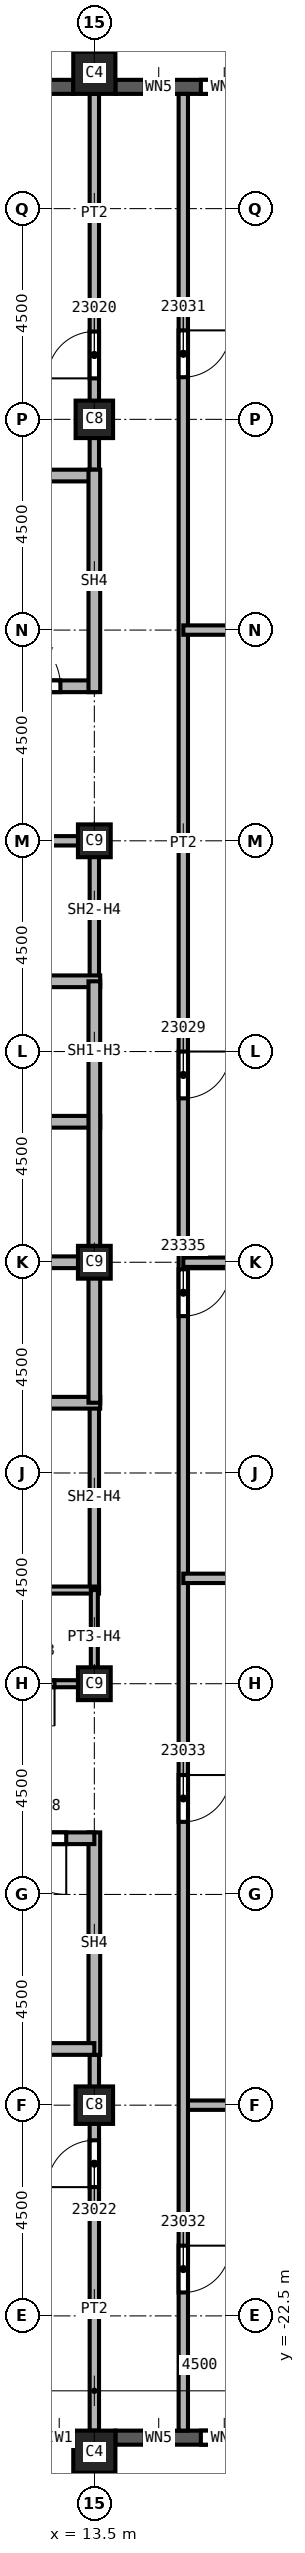
"""IFC4 building model, lengths in metres.
Left out: names, types, materials, properties, quantities, classifications, styles, units other than length and angle.
Written with IfcOpenShell. Run it as: python <this file> out.ifc"""

import sys

from ifc_helpers import new_model, si_unit, direction, frame, frame_2d, origin, origin_2d, place, context, subcontext, project, spatial, rectangle, extrude, element, fill, save


model = new_model("IFC4")
c1 = context("Model", 3, precision=1e-05, world=origin(), true_north=direction((0.0, 1.0)))
c2 = subcontext(c1, "Body", "Model", "MODEL_VIEW")
j1 = project(units=[si_unit("LENGTHUNIT", "METRE"), si_unit("PLANEANGLEUNIT", "RADIAN")], contexts=[c1])
p1 = place(None, origin())
s1 = spatial("IfcSite", under=j1, at=p1, CompositionType="ELEMENT")
p2 = place(p1, origin())
s2 = spatial("IfcBuilding", under=s1, at=p2, CompositionType="ELEMENT")
p3 = place(p2, frame((0.0, 0.0, 330.0)))
s3 = spatial("IfcBuildingStorey", under=s2, at=p3, CompositionType="ELEMENT", Elevation=330.0)
for number, where, z_axis, x_axis in (
    (1, (13.5, 18.0, 0.0), (0.0, 0.0, 1.0), (1.0, 0.0, 0.0)),
    (2, (13.5, -18.0, 0.0), (0.0, 0.0, 1.0), (1.0, 0.0, 0.0)),
):
    element("IfcColumn", number, at=place(p3, frame(where, z_axis=z_axis, x_axis=x_axis)), inside=s3, PredefinedType="COLUMN", context=c2, shape_type="SweptSolid", body=[
        extrude(rectangle(XDim=0.8, YDim=0.8, at=origin_2d()), origin(), (0.0, 0.0, 1.0), 3.74),
    ])
for number, where, z_axis, x_axis in (
    (3, (13.5, 0.0, 0.0), (0.0, 0.0, 1.0), (1.0, 0.0, 0.0)),
    (4, (13.5, 9.0, 0.0), (0.0, 0.0, 1.0), (1.0, 0.0, 0.0)),
    (5, (13.5, -9.0, 0.0), (0.0, 0.0, 1.0), (1.0, 0.0, 0.0)),
):
    element("IfcColumn", number, at=place(p3, frame(where, z_axis=z_axis, x_axis=x_axis)), inside=s3, PredefinedType="COLUMN", context=c2, shape_type="SweptSolid", body=[
        extrude(rectangle(XDim=0.7, YDim=0.7, at=origin_2d()), origin(), (0.0, 0.0, 1.0), 3.74),
    ])
for number, where, z_axis, x_axis in (
    (6, (13.5, 25.4, 0.0), (0.0, 0.0, 1.0), (1.0, 0.0, 0.0)),
    (7, (13.5, -25.4, 0.0), (0.0, 0.0, 1.0), (1.0, 0.0, 0.0)),
):
    element("IfcColumn", number, at=place(p3, frame(where, z_axis=z_axis, x_axis=x_axis)), inside=s3, PredefinedType="COLUMN", context=c2, shape_type="SweptSolid", body=[
        extrude(rectangle(XDim=0.9, YDim=0.9, at=origin_2d()), origin(), (0.0, 0.0, 1.0), 3.74),
    ])
p4 = place(p3, frame((9.45, -25.1, 0.0), z_axis=(0.0, 0.0, 1.0), x_axis=(1.0, 0.0, 0.0)))
e8 = element("IfcWall", 8, at=p4, inside=s3, PredefinedType="SOLIDWALL", context=c2, shape_type="SweptSolid", body=[
    extrude(rectangle(XDim=3.6, YDim=0.3, at=frame_2d((1.8, 0.0))), origin(), (0.0, 0.0, 1.0), 3.14),
])
p5 = place(p4, frame((0.6, 0.0, 0.8)))
e9 = element("IfcOpeningElement", 9, at=p5, cuts=e8, PredefinedType="OPENING", context=c2, shape_type="SweptSolid", body=[
    extrude(rectangle(XDim=2.4, YDim=1.95, at=frame_2d((1.2, 0.975))), frame((0.0, 0.15, 0.0), z_axis=(0.0, -1.0, 0.0), x_axis=(1.0, 0.0, 0.0)), (0.0, 0.0, 1.0), 0.3),
])
p6 = place(p3, frame((13.95, -25.1, 0.0), z_axis=(0.0, 0.0, 1.0), x_axis=(1.0, 0.0, 0.0)))
e10 = element("IfcWall", 10, at=p6, inside=s3, PredefinedType="SOLIDWALL", context=c2, shape_type="SweptSolid", body=[
    extrude(rectangle(XDim=3.6, YDim=0.3, at=frame_2d((1.8, 0.0))), origin(), (0.0, 0.0, 1.0), 3.14),
])
p7 = place(p6, frame((0.625, 0.0, 0.8)))
e11 = element("IfcOpeningElement", 11, at=p7, cuts=e10, PredefinedType="OPENING", context=c2, shape_type="SweptSolid", body=[
    extrude(rectangle(XDim=0.6, YDim=1.95, at=frame_2d((0.3, 0.975))), frame((0.0, 0.15, 0.0), z_axis=(0.0, -1.0, 0.0), x_axis=(1.0, 0.0, 0.0)), (0.0, 0.0, 1.0), 0.3),
])
p8 = place(p6, frame((1.825, 0.0, 0.8)))
e12 = element("IfcOpeningElement", 12, at=p8, cuts=e10, PredefinedType="OPENING", context=c2, shape_type="SweptSolid", body=[
    extrude(rectangle(XDim=1.0, YDim=1.95, at=frame_2d((0.5, 0.975))), frame((0.0, 0.15, 0.0), z_axis=(0.0, -1.0, 0.0), x_axis=(1.0, 0.0, 0.0)), (0.0, 0.0, 1.0), 0.3),
])
p9 = place(p3, frame((17.55, 25.1, 0.0), z_axis=(0.0, 0.0, 1.0), x_axis=(-1.0, 0.0, 0.0)))
e13 = element("IfcWall", 13, at=p9, inside=s3, PredefinedType="SOLIDWALL", context=c2, shape_type="SweptSolid", body=[
    extrude(rectangle(XDim=3.6, YDim=0.3, at=frame_2d((1.8, 0.0))), origin(), (0.0, 0.0, 1.0), 3.14),
])
p10 = place(p9, frame((0.775, 0.0, 0.8)))
e14 = element("IfcOpeningElement", 14, at=p10, cuts=e13, PredefinedType="OPENING", context=c2, shape_type="SweptSolid", body=[
    extrude(rectangle(XDim=1.0, YDim=1.95, at=frame_2d((0.5, 0.975))), frame((0.0, 0.15, 0.0), z_axis=(0.0, -1.0, 0.0), x_axis=(1.0, 0.0, 0.0)), (0.0, 0.0, 1.0), 0.3),
])
p11 = place(p9, frame((2.375, 0.0, 0.8)))
e15 = element("IfcOpeningElement", 15, at=p11, cuts=e13, PredefinedType="OPENING", context=c2, shape_type="SweptSolid", body=[
    extrude(rectangle(XDim=0.6, YDim=1.95, at=frame_2d((0.3, 0.975))), frame((0.0, 0.15, 0.0), z_axis=(0.0, -1.0, 0.0), x_axis=(1.0, 0.0, 0.0)), (0.0, 0.0, 1.0), 0.3),
])
p12 = place(p3, frame((13.05, 25.1, 0.0), z_axis=(0.0, 0.0, 1.0), x_axis=(-1.0, 0.0, 0.0)))
e16 = element("IfcWall", 16, at=p12, inside=s3, PredefinedType="SOLIDWALL", context=c2, shape_type="SweptSolid", body=[
    extrude(rectangle(XDim=3.6, YDim=0.3, at=frame_2d((1.8, 0.0))), origin(), (0.0, 0.0, 1.0), 3.14),
])
p13 = place(p12, frame((0.6, 0.0, 0.8)))
e17 = element("IfcOpeningElement", 17, at=p13, cuts=e16, PredefinedType="OPENING", context=c2, shape_type="SweptSolid", body=[
    extrude(rectangle(XDim=2.4, YDim=1.95, at=frame_2d((1.2, 0.975))), frame((0.0, 0.15, 0.0), z_axis=(0.0, -1.0, 0.0), x_axis=(1.0, 0.0, 0.0)), (0.0, 0.0, 1.0), 0.3),
])
p14 = place(p3, frame((13.5, -24.95, 0.0), z_axis=(0.0, 0.0, 1.0), x_axis=(0.0, 1.0, 0.0)))
e18 = element("IfcWall", 18, at=p14, inside=s3, PredefinedType="PARTITIONING", context=c2, shape_type="SweptSolid", body=[
    extrude(rectangle(XDim=8.275, YDim=0.2, at=frame_2d((4.137, 0.0))), origin(), (0.0, 0.0, 1.0), 3.74),
])
p15 = place(p14, frame((5.2, 0.0, 0.0)))
e19 = element("IfcOpeningElement", 19, at=p15, cuts=e18, PredefinedType="OPENING", context=c2, shape_type="SweptSolid", body=[
    extrude(rectangle(XDim=1.0, YDim=2.1, at=frame_2d((0.5, 1.05))), frame((0.0, 0.1, 0.0), z_axis=(0.0, -1.0, 0.0), x_axis=(1.0, 0.0, 0.0)), (0.0, 0.0, 1.0), 0.2),
])
p16 = place(p3, frame((13.5, 16.675, 0.0), z_axis=(0.0, 0.0, 1.0), x_axis=(0.0, 1.0, 0.0)))
e20 = element("IfcWall", 20, at=p16, inside=s3, PredefinedType="PARTITIONING", context=c2, shape_type="SweptSolid", body=[
    extrude(rectangle(XDim=8.275, YDim=0.2, at=frame_2d((4.137, 0.0))), origin(), (0.0, 0.0, 1.0), 3.74),
])
p17 = place(p16, frame((2.2, 0.0, 0.0)))
e21 = element("IfcOpeningElement", 21, at=p17, cuts=e20, PredefinedType="OPENING", context=c2, shape_type="SweptSolid", body=[
    extrude(rectangle(XDim=1.0, YDim=2.1, at=frame_2d((0.5, 1.05))), frame((0.0, 0.1, 0.0), z_axis=(0.0, -1.0, 0.0), x_axis=(1.0, 0.0, 0.0)), (0.0, 0.0, 1.0), 0.2),
])
p18 = place(p3, frame((15.4, -18.0, 0.0), z_axis=(0.0, 0.0, 1.0), x_axis=(1.0, 0.0, 0.0)))
e22 = element("IfcWall", 22, at=p18, inside=s3, PredefinedType="PARTITIONING", context=c2, shape_type="SweptSolid", body=[
    extrude(rectangle(XDim=8.9, YDim=0.2, at=frame_2d((4.45, 0.0))), origin(), (0.0, 0.0, 1.0), 3.74),
])
p19 = place(p3, frame((15.4, 24.95, 0.0), z_axis=(0.0, 0.0, 1.0), x_axis=(0.0, -1.0, 0.0)))
e23 = element("IfcWall", 23, at=p19, inside=s3, PredefinedType="PARTITIONING", context=c2, shape_type="SweptSolid", body=[
    extrude(rectangle(XDim=49.9, YDim=0.2, at=frame_2d((24.95, 0.0))), origin(), (0.0, 0.0, 1.0), 3.74),
])
p20 = place(p19, frame((20.45, 0.0, 0.0)))
e24 = element("IfcOpeningElement", 24, at=p20, cuts=e23, PredefinedType="OPENING", context=c2, shape_type="SweptSolid", body=[
    extrude(rectangle(XDim=1.0, YDim=2.1, at=frame_2d((0.5, 1.05))), frame((0.0, 0.1, 0.0), z_axis=(0.0, -1.0, 0.0), x_axis=(1.0, 0.0, 0.0)), (0.0, 0.0, 1.0), 0.2),
])
p21 = place(p19, frame((5.05, 0.0, 0.0)))
e25 = element("IfcOpeningElement", 25, at=p21, cuts=e23, PredefinedType="OPENING", context=c2, shape_type="SweptSolid", body=[
    extrude(rectangle(XDim=1.0, YDim=2.1, at=frame_2d((0.5, 1.05))), frame((0.0, 0.1, 0.0), z_axis=(0.0, -1.0, 0.0), x_axis=(1.0, 0.0, 0.0)), (0.0, 0.0, 1.0), 0.2),
])
p22 = place(p19, frame((45.95, 0.0, 0.0)))
e26 = element("IfcOpeningElement", 26, at=p22, cuts=e23, PredefinedType="OPENING", context=c2, shape_type="SweptSolid", body=[
    extrude(rectangle(XDim=1.0, YDim=2.1, at=frame_2d((0.5, 1.05))), frame((0.0, 0.1, 0.0), z_axis=(0.0, -1.0, 0.0), x_axis=(1.0, 0.0, 0.0)), (0.0, 0.0, 1.0), 0.2),
])
p23 = place(p19, frame((35.9, 0.0, 0.0)))
e27 = element("IfcOpeningElement", 27, at=p23, cuts=e23, PredefinedType="OPENING", context=c2, shape_type="SweptSolid", body=[
    extrude(rectangle(XDim=1.0, YDim=2.1, at=frame_2d((0.5, 1.05))), frame((0.0, 0.1, 0.0), z_axis=(0.0, -1.0, 0.0), x_axis=(1.0, 0.0, 0.0)), (0.0, 0.0, 1.0), 0.2),
])
p24 = place(p19, frame((25.1, 0.0, 0.0)))
e28 = element("IfcOpeningElement", 28, at=p24, cuts=e23, PredefinedType="OPENING", context=c2, shape_type="SweptSolid", body=[
    extrude(rectangle(XDim=1.0, YDim=2.1, at=frame_2d((0.5, 1.05))), frame((0.0, 0.1, 0.0), z_axis=(0.0, -1.0, 0.0), x_axis=(1.0, 0.0, 0.0)), (0.0, 0.0, 1.0), 0.2),
])
for number, where, z_axis, x_axis in (
    (29, (15.4, -6.75, 0.0), (0.0, 0.0, 1.0), (1.0, 0.0, 0.0)),
    (30, (15.4, 13.5, 0.0), (0.0, 0.0, 1.0), (1.0, 0.0, 0.0)),
    (31, (26.55, 0.0, 0.0), (0.0, 0.0, 1.0), (-1.0, 0.0, 0.0)),
):
    element("IfcWall", number, at=place(p3, frame(where, z_axis=z_axis, x_axis=x_axis)), inside=s3, PredefinedType="PARTITIONING", context=c2, shape_type="SweptSolid", body=[
        extrude(rectangle(XDim=11.15, YDim=0.2, at=frame_2d((5.575, 0.0))), origin(), (0.0, 0.0, 1.0), 3.74),
    ])
p25 = place(p3, frame((10.5, 9.0, 0.0), z_axis=(0.0, 0.0, 1.0), x_axis=(1.0, 0.0, 0.0)))
e32 = element("IfcWall", 32, at=p25, inside=s3, PredefinedType="SOLIDWALL", context=c2, shape_type="SweptSolid", body=[
    extrude(rectangle(XDim=3.0, YDim=0.2, at=frame_2d((1.5, 0.0))), origin(), (0.0, 0.0, 1.0), 3.062),
])
p26 = place(p3, frame((13.5, -3.0, 0.0), z_axis=(0.0, 0.0, 1.0), x_axis=(0.0, -1.0, 0.0)))
e33 = element("IfcWall", 33, at=p26, inside=s3, PredefinedType="SOLIDWALL", context=c2, shape_type="SweptSolid", body=[
    extrude(rectangle(XDim=4.0, YDim=0.2, at=frame_2d((2.0, 0.0))), origin(), (0.0, 0.0, 1.0), 3.062),
])
p27 = place(p3, frame((13.5, 9.1, 0.0), z_axis=(0.0, 0.0, 1.0), x_axis=(0.0, -1.0, 0.0)))
e34 = element("IfcWall", 34, at=p27, inside=s3, PredefinedType="SOLIDWALL", context=c2, shape_type="SweptSolid", body=[
    extrude(rectangle(XDim=3.1, YDim=0.2, at=frame_2d((1.55, 0.0))), origin(), (0.0, 0.0, 1.0), 3.062),
])
p28 = place(p3, frame((7.5, -3.0, 0.0), z_axis=(0.0, 0.0, 1.0), x_axis=(1.0, 0.0, 0.0)))
e35 = element("IfcWall", 35, at=p28, inside=s3, PredefinedType="SOLIDWALL", context=c2, shape_type="SweptSolid", body=[
    extrude(rectangle(XDim=6.125, YDim=0.25, at=frame_2d((3.062, 0.0))), origin(), (0.0, 0.0, 1.0), 3.74),
])
p29 = place(p28, frame((1.75, 0.0, 0.0)))
e36 = element("IfcOpeningElement", 36, at=p29, cuts=e35, PredefinedType="OPENING", context=c2, shape_type="SweptSolid", body=[
    extrude(rectangle(XDim=1.1, YDim=2.1, at=frame_2d((0.55, 1.05))), frame((0.0, 0.125, 0.0), z_axis=(0.0, -1.0, 0.0), x_axis=(1.0, 0.0, 0.0)), (0.0, 0.0, 1.0), 0.25),
])
p30 = place(p3, frame((7.5, 3.0, 0.0), z_axis=(0.0, 0.0, 1.0), x_axis=(1.0, 0.0, 0.0)))
e37 = element("IfcWall", 37, at=p30, inside=s3, PredefinedType="SOLIDWALL", context=c2, shape_type="SweptSolid", body=[
    extrude(rectangle(XDim=6.125, YDim=0.25, at=frame_2d((3.062, 0.0))), origin(), (0.0, 0.0, 1.0), 3.74),
])
p31 = place(p30, frame((1.75, 0.0, 0.0)))
e38 = element("IfcOpeningElement", 38, at=p31, cuts=e37, PredefinedType="OPENING", context=c2, shape_type="SweptSolid", body=[
    extrude(rectangle(XDim=1.1, YDim=2.1, at=frame_2d((0.55, 1.05))), frame((0.0, 0.125, 0.0), z_axis=(0.0, -1.0, 0.0), x_axis=(1.0, 0.0, 0.0)), (0.0, 0.0, 1.0), 0.25),
])
for number, where, z_axis, x_axis in (
    (39, (10.5, 0.0, 0.0), (0.0, 0.0, 1.0), (1.0, 0.0, 0.0)),
    (40, (10.5, 6.0, 0.0), (0.0, 0.0, 1.0), (1.0, 0.0, 0.0)),
):
    element("IfcWall", number, at=place(p3, frame(where, z_axis=z_axis, x_axis=x_axis)), inside=s3, PredefinedType="SOLIDWALL", context=c2, shape_type="SweptSolid", body=[
        extrude(rectangle(XDim=3.125, YDim=0.25, at=frame_2d((1.562, 0.0))), origin(), (0.0, 0.0, 1.0), 3.74),
    ])
p32 = place(p3, frame((13.5, 6.0, 0.0), z_axis=(0.0, 0.0, 1.0), x_axis=(0.0, -1.0, 0.0)))
e41 = element("IfcWall", 41, at=p32, inside=s3, PredefinedType="SOLIDWALL", context=c2, shape_type="SweptSolid", body=[
    extrude(rectangle(XDim=9.0, YDim=0.25, at=frame_2d((4.5, 0.0))), origin(), (0.0, 0.0, 1.0), 3.062),
])
p33 = place(p3, frame((4.375, 12.3, 0.0), z_axis=(0.0, 0.0, 1.0), x_axis=(1.0, 0.0, 0.0)))
e42 = element("IfcWall", 42, at=p33, inside=s3, PredefinedType="SOLIDWALL", context=c2, shape_type="SweptSolid", body=[
    extrude(rectangle(XDim=9.125, YDim=0.25, at=frame_2d((4.562, 0.0))), origin(), (0.0, 0.0, 1.0), 3.74),
])
p34 = place(p33, frame((7.2, 0.0, 0.0)))
e43 = element("IfcOpeningElement", 43, at=p34, cuts=e42, PredefinedType="OPENING", context=c2, shape_type="SweptSolid", body=[
    extrude(rectangle(XDim=1.2, YDim=2.1, at=frame_2d((0.6, 1.05))), frame((0.0, 0.125, 0.0), z_axis=(0.0, -1.0, 0.0), x_axis=(1.0, 0.0, 0.0)), (0.0, 0.0, 1.0), 0.25),
])
p35 = place(p3, frame((4.375, 16.8, 0.0), z_axis=(0.0, 0.0, 1.0), x_axis=(1.0, 0.0, 0.0)))
e44 = element("IfcWall", 44, at=p35, inside=s3, PredefinedType="SOLIDWALL", context=c2, shape_type="SweptSolid", body=[
    extrude(rectangle(XDim=9.125, YDim=0.25, at=frame_2d((4.562, 0.0))), origin(), (0.0, 0.0, 1.0), 3.74),
])
p36 = place(p3, frame((13.5, -16.925, 0.0), z_axis=(0.0, 0.0, 1.0), x_axis=(0.0, 1.0, 0.0)))
e45 = element("IfcWall", 45, at=p36, inside=s3, PredefinedType="SOLIDWALL", context=c2, shape_type="SweptSolid", body=[
    extrude(rectangle(XDim=4.75, YDim=0.25, at=frame_2d((2.375, 0.0))), origin(), (0.0, 0.0, 1.0), 3.74),
])
p37 = place(p3, frame((13.5, -16.8, 0.0), z_axis=(0.0, 0.0, 1.0), x_axis=(-1.0, 0.0, 0.0)))
e46 = element("IfcWall", 46, at=p37, inside=s3, PredefinedType="SOLIDWALL", context=c2, shape_type="SweptSolid", body=[
    extrude(rectangle(XDim=9.125, YDim=0.25, at=frame_2d((4.562, 0.0))), origin(), (0.0, 0.0, 1.0), 3.74),
])
p38 = place(p3, frame((13.5, -12.3, 0.0), z_axis=(0.0, 0.0, 1.0), x_axis=(-1.0, 0.0, 0.0)))
e47 = element("IfcWall", 47, at=p38, inside=s3, PredefinedType="SOLIDWALL", context=c2, shape_type="SweptSolid", body=[
    extrude(rectangle(XDim=9.125, YDim=0.25, at=frame_2d((4.562, 0.0))), origin(), (0.0, 0.0, 1.0), 3.74),
])
p39 = place(p38, frame((0.6, 0.0, 0.0)))
e48 = element("IfcOpeningElement", 48, at=p39, cuts=e47, PredefinedType="OPENING", context=c2, shape_type="SweptSolid", body=[
    extrude(rectangle(XDim=1.2, YDim=2.1, at=frame_2d((0.6, 1.05))), frame((0.0, 0.125, 0.0), z_axis=(0.0, -1.0, 0.0), x_axis=(1.0, 0.0, 0.0)), (0.0, 0.0, 1.0), 0.25),
])
p40 = place(p3, frame((13.5, 12.175, 0.0), z_axis=(0.0, 0.0, 1.0), x_axis=(0.0, 1.0, 0.0)))
e49 = element("IfcWall", 49, at=p40, inside=s3, PredefinedType="SOLIDWALL", context=c2, shape_type="SweptSolid", body=[
    extrude(rectangle(XDim=4.75, YDim=0.25, at=frame_2d((2.375, 0.0))), origin(), (0.0, 0.0, 1.0), 3.74),
])
p41 = place(p3, frame((10.5, -7.0, 0.0), z_axis=(0.0, 0.0, 1.0), x_axis=(1.0, 0.0, 0.0)))
e50 = element("IfcWall", 50, at=p41, inside=s3, PredefinedType="PARTITIONING", context=c2, shape_type="SweptSolid", body=[
    extrude(rectangle(XDim=3.1, YDim=0.15, at=frame_2d((1.55, 0.0))), origin(), (0.0, 0.0, 1.0), 3.74),
])
p42 = place(p3, frame((13.5, -9.0, 0.0), z_axis=(0.0, 0.0, 1.0), x_axis=(-1.0, 0.0, 0.0)))
e51 = element("IfcWall", 51, at=p42, inside=s3, PredefinedType="PARTITIONING", context=c2, shape_type="SweptSolid", body=[
    extrude(rectangle(XDim=3.0, YDim=0.15, at=frame_2d((1.5, 0.0))), origin(), (0.0, 0.0, 1.0), 3.062),
])
p43 = place(p42, frame((0.85, 0.0, 0.0)))
e52 = element("IfcOpeningElement", 52, at=p43, cuts=e51, PredefinedType="OPENING", context=c2, shape_type="SweptSolid", body=[
    extrude(rectangle(XDim=0.9, YDim=2.1, at=frame_2d((0.45, 1.05))), frame((0.0, 0.075, 0.0), z_axis=(0.0, -1.0, 0.0), x_axis=(1.0, 0.0, 0.0)), (0.0, 0.0, 1.0), 0.15),
])
p44 = place(p3, frame((13.5, -7.0, 0.0), z_axis=(0.0, 0.0, 1.0), x_axis=(0.0, -1.0, 0.0)))
e53 = element("IfcWall", 53, at=p44, inside=s3, PredefinedType="PARTITIONING", context=c2, shape_type="SweptSolid", body=[
    extrude(rectangle(XDim=2.075, YDim=0.15, at=frame_2d((1.038, 0.0))), origin(), (0.0, 0.0, 1.0), 3.062),
])
p45 = place(p43, origin())
e54 = element("IfcDoor", 54, at=p45, inside=s3, OperationType="SINGLE_SWING_RIGHT", PredefinedType="DOOR", context=c2, shape_type="SweptSolid", body=[
    extrude(rectangle(XDim=0.9, YDim=2.1, at=frame_2d((0.45, 1.05))), frame((0.0, 0.025, 0.0), z_axis=(0.0, -1.0, 0.0), x_axis=(1.0, 0.0, 0.0)), (0.0, 0.0, 1.0), 0.05),
])
fill(e52, e54)
p46 = place(p34, origin())
e55 = element("IfcDoor", 55, at=p46, inside=s3, OperationType="SINGLE_SWING_RIGHT", PredefinedType="DOOR", context=c2, shape_type="SweptSolid", body=[
    extrude(rectangle(XDim=1.2, YDim=2.1, at=frame_2d((0.6, 1.05))), frame((0.0, 0.025, 0.0), z_axis=(0.0, -1.0, 0.0), x_axis=(1.0, 0.0, 0.0)), (0.0, 0.0, 1.0), 0.05),
])
fill(e43, e55)
p47 = place(p39, origin())
e56 = element("IfcDoor", 56, at=p47, inside=s3, OperationType="SINGLE_SWING_LEFT", PredefinedType="DOOR", context=c2, shape_type="SweptSolid", body=[
    extrude(rectangle(XDim=1.2, YDim=2.1, at=frame_2d((0.6, 1.05))), frame((0.0, 0.025, 0.0), z_axis=(0.0, -1.0, 0.0), x_axis=(1.0, 0.0, 0.0)), (0.0, 0.0, 1.0), 0.05),
])
fill(e48, e56)
p48 = place(p17, origin())
e57 = element("IfcDoor", 57, at=p48, inside=s3, OperationType="SINGLE_SWING_LEFT", PredefinedType="DOOR", context=c2, shape_type="SweptSolid", body=[
    extrude(rectangle(XDim=1.0, YDim=2.1, at=frame_2d((0.5, 1.05))), frame((0.0, 0.025, 0.0), z_axis=(0.0, -1.0, 0.0), x_axis=(1.0, 0.0, 0.0)), (0.0, 0.0, 1.0), 0.05),
])
fill(e21, e57)
p49 = place(p15, origin())
e58 = element("IfcDoor", 58, at=p49, inside=s3, OperationType="SINGLE_SWING_LEFT", PredefinedType="DOOR", context=c2, shape_type="SweptSolid", body=[
    extrude(rectangle(XDim=1.0, YDim=2.1, at=frame_2d((0.5, 1.05))), frame((0.0, 0.025, 0.0), z_axis=(0.0, -1.0, 0.0), x_axis=(1.0, 0.0, 0.0)), (0.0, 0.0, 1.0), 0.05),
])
fill(e19, e58)
p50 = place(p20, origin())
e59 = element("IfcDoor", 59, at=p50, inside=s3, OperationType="SINGLE_SWING_RIGHT", PredefinedType="DOOR", context=c2, shape_type="SweptSolid", body=[
    extrude(rectangle(XDim=1.0, YDim=2.1, at=frame_2d((0.5, 1.05))), frame((0.0, 0.025, 0.0), z_axis=(0.0, -1.0, 0.0), x_axis=(1.0, 0.0, 0.0)), (0.0, 0.0, 1.0), 0.05),
])
fill(e24, e59)
p51 = place(p21, origin())
e60 = element("IfcDoor", 60, at=p51, inside=s3, OperationType="SINGLE_SWING_RIGHT", PredefinedType="DOOR", context=c2, shape_type="SweptSolid", body=[
    extrude(rectangle(XDim=1.0, YDim=2.1, at=frame_2d((0.5, 1.05))), frame((0.0, 0.025, 0.0), z_axis=(0.0, -1.0, 0.0), x_axis=(1.0, 0.0, 0.0)), (0.0, 0.0, 1.0), 0.05),
])
fill(e25, e60)
p52 = place(p22, origin())
e61 = element("IfcDoor", 61, at=p52, inside=s3, OperationType="SINGLE_SWING_LEFT", PredefinedType="DOOR", context=c2, shape_type="SweptSolid", body=[
    extrude(rectangle(XDim=1.0, YDim=2.1, at=frame_2d((0.5, 1.05))), frame((0.0, 0.025, 0.0), z_axis=(0.0, -1.0, 0.0), x_axis=(1.0, 0.0, 0.0)), (0.0, 0.0, 1.0), 0.05),
])
fill(e26, e61)
p53 = place(p23, origin())
e62 = element("IfcDoor", 62, at=p53, inside=s3, OperationType="SINGLE_SWING_RIGHT", PredefinedType="DOOR", context=c2, shape_type="SweptSolid", body=[
    extrude(rectangle(XDim=1.0, YDim=2.1, at=frame_2d((0.5, 1.05))), frame((0.0, 0.025, 0.0), z_axis=(0.0, -1.0, 0.0), x_axis=(1.0, 0.0, 0.0)), (0.0, 0.0, 1.0), 0.05),
])
fill(e27, e62)
p54 = place(p24, origin())
e63 = element("IfcDoor", 63, at=p54, inside=s3, OperationType="SINGLE_SWING_RIGHT", PredefinedType="DOOR", context=c2, shape_type="SweptSolid", body=[
    extrude(rectangle(XDim=1.0, YDim=2.1, at=frame_2d((0.5, 1.05))), frame((0.0, 0.025, 0.0), z_axis=(0.0, -1.0, 0.0), x_axis=(1.0, 0.0, 0.0)), (0.0, 0.0, 1.0), 0.05),
])
fill(e28, e63)
p55 = place(p7, origin())
e64 = element("IfcWindow", 64, at=p55, inside=s3, PartitioningType="SINGLE_PANEL", PredefinedType="WINDOW", context=c2, shape_type="SweptSolid", body=[
    extrude(rectangle(XDim=0.6, YDim=1.95, at=frame_2d((0.3, 0.975))), frame((0.0, 0.03, 0.0), z_axis=(0.0, -1.0, 0.0), x_axis=(1.0, 0.0, 0.0)), (0.0, 0.0, 1.0), 0.06),
])
fill(e11, e64)
p56 = place(p8, origin())
e65 = element("IfcWindow", 65, at=p56, inside=s3, PartitioningType="SINGLE_PANEL", PredefinedType="WINDOW", context=c2, shape_type="SweptSolid", body=[
    extrude(rectangle(XDim=1.0, YDim=1.95, at=frame_2d((0.5, 0.975))), frame((0.0, 0.03, 0.0), z_axis=(0.0, -1.0, 0.0), x_axis=(1.0, 0.0, 0.0)), (0.0, 0.0, 1.0), 0.06),
])
fill(e12, e65)
p57 = place(p10, origin())
e66 = element("IfcWindow", 66, at=p57, inside=s3, PartitioningType="SINGLE_PANEL", PredefinedType="WINDOW", context=c2, shape_type="SweptSolid", body=[
    extrude(rectangle(XDim=1.0, YDim=1.95, at=frame_2d((0.5, 0.975))), frame((0.0, 0.03, 0.0), z_axis=(0.0, -1.0, 0.0), x_axis=(1.0, 0.0, 0.0)), (0.0, 0.0, 1.0), 0.06),
])
fill(e14, e66)
p58 = place(p11, origin())
e67 = element("IfcWindow", 67, at=p58, inside=s3, PartitioningType="SINGLE_PANEL", PredefinedType="WINDOW", context=c2, shape_type="SweptSolid", body=[
    extrude(rectangle(XDim=0.6, YDim=1.95, at=frame_2d((0.3, 0.975))), frame((0.0, 0.03, 0.0), z_axis=(0.0, -1.0, 0.0), x_axis=(1.0, 0.0, 0.0)), (0.0, 0.0, 1.0), 0.06),
])
fill(e15, e67)
save(model, sys.argv[1])
